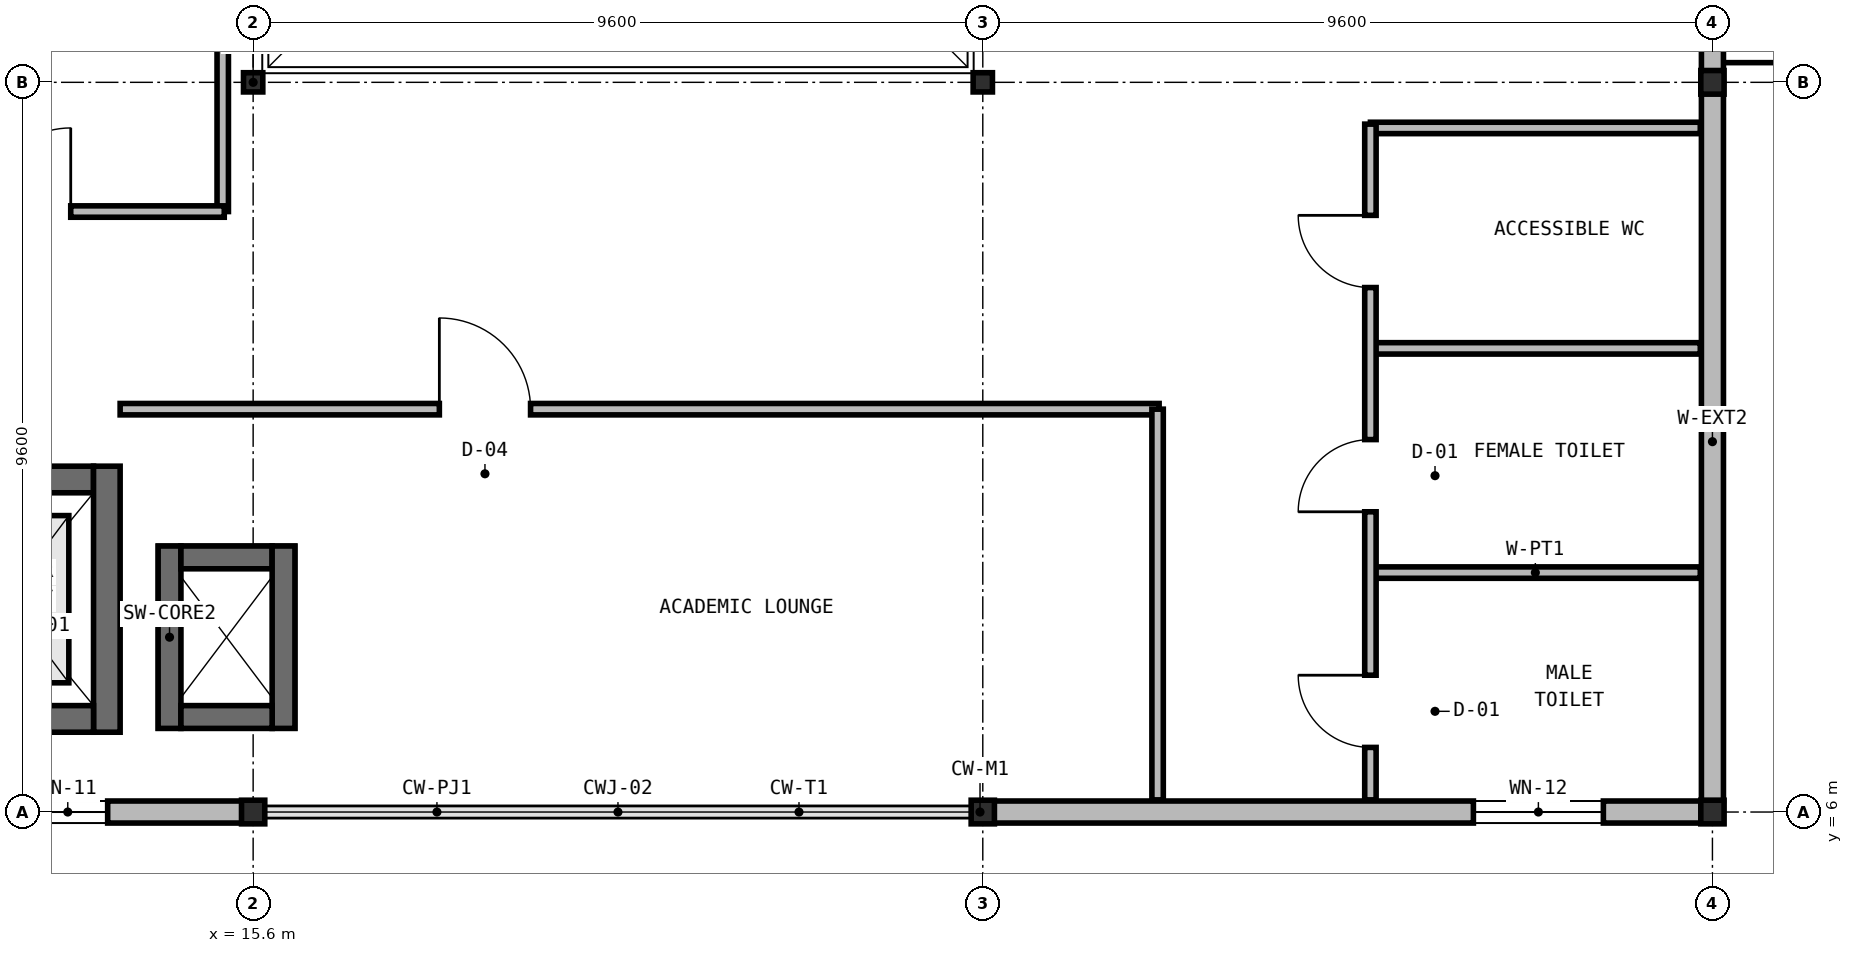
"""IFC4 building model, lengths in metres.
Left out: names, types, materials, properties, quantities, classifications, styles, units other than length and angle.
Written with IfcOpenShell. Run it as: python <this file> out.ifc"""

import sys

from ifc_helpers import new_model, si_unit, direction, frame, frame_2d, origin, origin_2d, place, context, subcontext, project, spatial, rectangle, i_section, extrude, element, fill, save


model = new_model("IFC4")
c1 = context("Model", 3, precision=1e-05, world=origin(), true_north=direction((0.0, 1.0)))
c2 = subcontext(c1, "Body", "Model", "MODEL_VIEW")
j1 = project(units=[si_unit("LENGTHUNIT", "METRE"), si_unit("PLANEANGLEUNIT", "RADIAN")], contexts=[c1])
p1 = place(None, origin())
s1 = spatial("IfcSite", under=j1, at=p1, CompositionType="ELEMENT")
p2 = place(p1, origin())
s2 = spatial("IfcBuilding", under=s1, at=p2, CompositionType="ELEMENT")
p3 = place(p2, frame((0.0, 0.0, 5.25)))
s3 = spatial("IfcBuildingStorey", under=s2, at=p3, CompositionType="ELEMENT", Elevation=5.25)
p4 = place(p3, frame((11.2, 10.375, 0.0), z_axis=(0.0, 0.0, 1.0), x_axis=(1.0, 0.0, 0.0)))
e1 = element("IfcWall", 1, at=p4, inside=s3, PredefinedType="SHEAR", context=c2, shape_type="SweptSolid", body=[
    extrude(rectangle(XDim=2.3, YDim=0.35, at=frame_2d((1.15, 0.0))), origin(), (0.0, 0.0, 1.0), 4.55),
])
p5 = place(p4, frame((0.6, 0.0, 0.0)))
e2 = element("IfcOpeningElement", 2, at=p5, cuts=e1, PredefinedType="OPENING", context=c2, shape_type="SweptSolid", body=[
    extrude(rectangle(XDim=1.1, YDim=2.15, at=frame_2d((0.55, 1.075))), frame((0.0, 0.185, 0.0), z_axis=(0.0, -1.0, 0.0), x_axis=(1.0, 0.0, 0.0)), (0.0, 0.0, 1.0), 0.37),
])
p6 = place(p3, frame((13.675, 10.55, 0.0), z_axis=(0.0, 0.0, 1.0), x_axis=(0.0, -1.0, 0.0)))
e3 = element("IfcWall", 3, at=p6, inside=s3, PredefinedType="SHEAR", context=c2, shape_type="SweptSolid", body=[
    extrude(rectangle(XDim=3.5, YDim=0.35, at=frame_2d((1.75, 0.0))), origin(), (0.0, 0.0, 1.0), 4.55),
])
p7 = place(p3, frame((13.5, 7.225, 0.0), z_axis=(0.0, 0.0, 1.0), x_axis=(-1.0, 0.0, 0.0)))
e4 = element("IfcWall", 4, at=p7, inside=s3, PredefinedType="SHEAR", context=c2, shape_type="SweptSolid", body=[
    extrude(rectangle(XDim=2.3, YDim=0.35, at=frame_2d((1.15, 0.0))), origin(), (0.0, 0.0, 1.0), 4.55),
])
p8 = place(p3, frame((15.6, 6.0, 0.0), z_axis=(0.0, 0.0, 1.0), x_axis=(1.0, 0.0, 0.0)))
e5 = element("IfcColumn", 5, at=p8, inside=s3, PredefinedType="COLUMN", context=c2, shape_type="SweptSolid", body=[
    extrude(i_section(OverallWidth=0.306, OverallDepth=0.311, WebThickness=0.011, FlangeThickness=0.017, at=origin_2d()), origin(), (0.0, 0.0, 1.0), 4.55),
])
p9 = place(p3, frame((15.6, 15.6, 0.0), z_axis=(0.0, 0.0, 1.0), x_axis=(1.0, 0.0, 0.0)))
e6 = element("IfcColumn", 6, at=p9, inside=s3, PredefinedType="COLUMN", context=c2, shape_type="SweptSolid", body=[
    extrude(i_section(OverallWidth=0.254, OverallDepth=0.253, WebThickness=0.009, FlangeThickness=0.014, at=origin_2d()), origin(), (0.0, 0.0, 1.0), 4.55),
])
p10 = place(p3, frame((25.2, 6.0, 0.0), z_axis=(0.0, 0.0, 1.0), x_axis=(1.0, 0.0, 0.0)))
e7 = element("IfcColumn", 7, at=p10, inside=s3, PredefinedType="COLUMN", context=c2, shape_type="SweptSolid", body=[
    extrude(i_section(OverallWidth=0.306, OverallDepth=0.311, WebThickness=0.011, FlangeThickness=0.017, at=origin_2d()), origin(), (0.0, 0.0, 1.0), 4.55),
])
p11 = place(p3, frame((25.2, 15.6, 0.0), z_axis=(0.0, 0.0, 1.0), x_axis=(1.0, 0.0, 0.0)))
e8 = element("IfcColumn", 8, at=p11, inside=s3, PredefinedType="COLUMN", context=c2, shape_type="SweptSolid", body=[
    extrude(i_section(OverallWidth=0.254, OverallDepth=0.253, WebThickness=0.009, FlangeThickness=0.014, at=origin_2d()), origin(), (0.0, 0.0, 1.0), 4.55),
])
for number, where, z_axis, x_axis in (
    (9, (34.8, 6.0, 0.0), (0.0, 0.0, 1.0), (1.0, 0.0, 0.0)),
    (10, (34.8, 15.6, 0.0), (0.0, 0.0, 1.0), (1.0, 0.0, 0.0)),
):
    element("IfcColumn", number, at=place(p3, frame(where, z_axis=z_axis, x_axis=x_axis)), inside=s3, PredefinedType="COLUMN", context=c2, shape_type="SweptSolid", body=[
        extrude(i_section(OverallWidth=0.306, OverallDepth=0.311, WebThickness=0.011, FlangeThickness=0.017, at=origin_2d()), origin(), (0.0, 0.0, 1.0), 4.55),
    ])
p12 = place(p3, frame((14.5, 7.1, 0.0), z_axis=(0.0, 0.0, 1.0), x_axis=(0.0, 1.0, 0.0)))
e11 = element("IfcWall", 11, at=p12, inside=s3, PredefinedType="SHEAR", context=c2, shape_type="SweptSolid", body=[
    extrude(rectangle(XDim=2.4, YDim=0.3, at=frame_2d((1.2, 0.0))), origin(), (0.0, 0.0, 1.0), 4.37),
])
p13 = place(p3, frame((14.65, 9.35, 0.0), z_axis=(0.0, 0.0, 1.0), x_axis=(1.0, 0.0, 0.0)))
e12 = element("IfcWall", 12, at=p13, inside=s3, PredefinedType="SHEAR", context=c2, shape_type="SweptSolid", body=[
    extrude(rectangle(XDim=1.2, YDim=0.3, at=frame_2d((0.6, 0.0))), origin(), (0.0, 0.0, 1.0), 4.37),
])
p14 = place(p3, frame((16.0, 9.5, 0.0), z_axis=(0.0, 0.0, 1.0), x_axis=(0.0, -1.0, 0.0)))
e13 = element("IfcWall", 13, at=p14, inside=s3, PredefinedType="SHEAR", context=c2, shape_type="SweptSolid", body=[
    extrude(rectangle(XDim=2.4, YDim=0.3, at=frame_2d((1.2, 0.0))), origin(), (0.0, 0.0, 1.0), 4.37),
])
p15 = place(p3, frame((15.85, 7.25, 0.0), z_axis=(0.0, 0.0, 1.0), x_axis=(-1.0, 0.0, 0.0)))
e14 = element("IfcWall", 14, at=p15, inside=s3, PredefinedType="SHEAR", context=c2, shape_type="SweptSolid", body=[
    extrude(rectangle(XDim=1.2, YDim=0.3, at=frame_2d((0.6, 0.0))), origin(), (0.0, 0.0, 1.0), 4.37),
])
p16 = place(p3, frame((34.8, 15.596, 0.0), z_axis=(0.0, 0.0, 1.0), x_axis=(0.0, -1.0, 0.0)))
e15 = element("IfcWall", 15, at=p16, inside=s3, PredefinedType="SOLIDWALL", context=c2, shape_type="SweptSolid", body=[
    extrude(rectangle(XDim=9.447, YDim=0.29, at=frame_2d((4.724, 0.0))), origin(), (0.0, 0.0, 1.0), 3.884),
])
p17 = place(p3, frame((34.8, 25.196, 0.0), z_axis=(0.0, 0.0, 1.0), x_axis=(0.0, -1.0, 0.0)))
e16 = element("IfcWall", 16, at=p17, inside=s3, PredefinedType="SOLIDWALL", context=c2, shape_type="SweptSolid", body=[
    extrude(rectangle(XDim=9.592, YDim=0.29, at=frame_2d((4.796, 0.0))), origin(), (0.0, 0.0, 1.0), 3.862),
])
p18 = place(p17, frame((4.2, 0.0, 0.0)))
e17 = element("IfcOpeningElement", 17, at=p18, cuts=e16, PredefinedType="OPENING", context=c2, shape_type="SweptSolid", body=[
    extrude(rectangle(XDim=1.4, YDim=2.2, at=frame_2d((0.7, 1.1))), frame((0.0, 0.155, 0.0), z_axis=(0.0, -1.0, 0.0), x_axis=(1.0, 0.0, 0.0)), (0.0, 0.0, 1.0), 0.31),
])
p19 = place(p3, frame((15.596, 6.0, 0.0), z_axis=(0.0, 0.0, 1.0), x_axis=(-1.0, 0.0, 0.0)))
e18 = element("IfcWall", 18, at=p19, inside=s3, PredefinedType="SOLIDWALL", context=c2, shape_type="SweptSolid", body=[
    extrude(rectangle(XDim=9.741, YDim=0.29, at=frame_2d((4.871, 0.0))), origin(), (0.0, 0.0, 1.0), 3.884),
])
p20 = place(p19, frame((1.91, 0.0, 0.95)))
e19 = element("IfcOpeningElement", 19, at=p20, cuts=e18, PredefinedType="OPENING", context=c2, shape_type="SweptSolid", body=[
    extrude(rectangle(XDim=1.05, YDim=1.64, at=frame_2d((0.525, 0.82))), frame((0.0, 0.155, 0.0), z_axis=(0.0, -1.0, 0.0), x_axis=(1.0, 0.0, 0.0)), (0.0, 0.0, 1.0), 0.31),
])
p21 = place(p19, frame((6.781, 0.0, 0.95)))
e20 = element("IfcOpeningElement", 20, at=p21, cuts=e18, PredefinedType="OPENING", context=c2, shape_type="SweptSolid", body=[
    extrude(rectangle(XDim=1.05, YDim=1.64, at=frame_2d((0.525, 0.82))), frame((0.0, 0.155, 0.0), z_axis=(0.0, -1.0, 0.0), x_axis=(1.0, 0.0, 0.0)), (0.0, 0.0, 1.0), 0.31),
])
p22 = place(p3, frame((34.945, 6.0, 0.0), z_axis=(0.0, 0.0, 1.0), x_axis=(-1.0, 0.0, 0.0)))
e21 = element("IfcWall", 21, at=p22, inside=s3, PredefinedType="SOLIDWALL", context=c2, shape_type="SweptSolid", body=[
    extrude(rectangle(XDim=9.741, YDim=0.29, at=frame_2d((4.871, 0.0))), origin(), (0.0, 0.0, 1.0), 3.884),
])
p23 = place(p22, frame((1.58, 0.0, 0.95)))
e22 = element("IfcOpeningElement", 22, at=p23, cuts=e21, PredefinedType="OPENING", context=c2, shape_type="SweptSolid", body=[
    extrude(rectangle(XDim=1.71, YDim=1.48, at=frame_2d((0.855, 0.74))), frame((0.0, 0.155, 0.0), z_axis=(0.0, -1.0, 0.0), x_axis=(1.0, 0.0, 0.0)), (0.0, 0.0, 1.0), 0.31),
])
for number, where, z_axis, x_axis in (
    (23, (30.3, 9.15, 0.0), (0.0, 0.0, 1.0), (1.0, 0.0, 0.0)),
    (24, (30.3, 12.1, 0.0), (0.0, 0.0, 1.0), (1.0, 0.0, 0.0)),
    (25, (30.3, 15.0, 0.0), (0.0, 0.0, 1.0), (1.0, 0.0, 0.0)),
):
    element("IfcWall", number, at=place(p3, frame(where, z_axis=z_axis, x_axis=x_axis)), inside=s3, PredefinedType="PARTITIONING", context=c2, shape_type="SweptSolid", body=[
        extrude(rectangle(XDim=4.34, YDim=0.15, at=frame_2d((2.17, 0.0))), origin(), (0.0, 0.0, 1.0), 4.23),
    ])
p24 = place(p3, frame((30.3, 6.16, 0.0), z_axis=(0.0, 0.0, 1.0), x_axis=(0.0, 1.0, 0.0)))
e26 = element("IfcWall", 26, at=p24, inside=s3, PredefinedType="PARTITIONING", context=c2, shape_type="SweptSolid", body=[
    extrude(rectangle(XDim=8.89, YDim=0.15, at=frame_2d((4.445, 0.0))), origin(), (0.0, 0.0, 1.0), 4.23),
])
p25 = place(p24, frame((0.69, 0.0, 0.0)))
e27 = element("IfcOpeningElement", 27, at=p25, cuts=e26, PredefinedType="OPENING", context=c2, shape_type="SweptSolid", body=[
    extrude(rectangle(XDim=0.95, YDim=2.1, at=frame_2d((0.475, 1.05))), frame((0.0, 0.085, 0.0), z_axis=(0.0, -1.0, 0.0), x_axis=(1.0, 0.0, 0.0)), (0.0, 0.0, 1.0), 0.17),
])
p26 = place(p24, frame((3.79, 0.0, 0.0)))
e28 = element("IfcOpeningElement", 28, at=p26, cuts=e26, PredefinedType="OPENING", context=c2, shape_type="SweptSolid", body=[
    extrude(rectangle(XDim=0.95, YDim=2.1, at=frame_2d((0.475, 1.05))), frame((0.0, 0.085, 0.0), z_axis=(0.0, -1.0, 0.0), x_axis=(1.0, 0.0, 0.0)), (0.0, 0.0, 1.0), 0.17),
])
p27 = place(p24, frame((6.74, 0.0, 0.0)))
e29 = element("IfcOpeningElement", 29, at=p27, cuts=e26, PredefinedType="OPENING", context=c2, shape_type="SweptSolid", body=[
    extrude(rectangle(XDim=0.95, YDim=2.1, at=frame_2d((0.475, 1.05))), frame((0.0, 0.085, 0.0), z_axis=(0.0, -1.0, 0.0), x_axis=(1.0, 0.0, 0.0)), (0.0, 0.0, 1.0), 0.17),
])
p28 = place(p3, frame((13.85, 11.3, 0.0), z_axis=(0.0, 0.0, 1.0), x_axis=(1.0, 0.0, 0.0)))
e30 = element("IfcWall", 30, at=p28, inside=s3, PredefinedType="PARTITIONING", context=c2, shape_type="SweptSolid", body=[
    extrude(rectangle(XDim=13.67, YDim=0.15, at=frame_2d((6.835, 0.0))), origin(), (0.0, 0.0, 1.0), 4.23),
])
p29 = place(p28, frame((4.2, 0.0, 0.0)))
e31 = element("IfcOpeningElement", 31, at=p29, cuts=e30, PredefinedType="OPENING", context=c2, shape_type="SweptSolid", body=[
    extrude(rectangle(XDim=1.2, YDim=2.2, at=frame_2d((0.6, 1.1))), frame((0.0, 0.085, 0.0), z_axis=(0.0, -1.0, 0.0), x_axis=(1.0, 0.0, 0.0)), (0.0, 0.0, 1.0), 0.17),
])
p30 = place(p3, frame((27.5, 6.16, 0.0), z_axis=(0.0, 0.0, 1.0), x_axis=(0.0, 1.0, 0.0)))
e32 = element("IfcWall", 32, at=p30, inside=s3, PredefinedType="PARTITIONING", context=c2, shape_type="SweptSolid", body=[
    extrude(rectangle(XDim=5.14, YDim=0.15, at=frame_2d((2.57, 0.0))), origin(), (0.0, 0.0, 1.0), 4.23),
])
p31 = place(p3, frame((15.2, 13.9, 0.0), z_axis=(0.0, 0.0, 1.0), x_axis=(0.0, 1.0, 0.0)))
e33 = element("IfcWall", 33, at=p31, inside=s3, PredefinedType="PARTITIONING", context=c2, shape_type="SweptSolid", body=[
    extrude(rectangle(XDim=20.74, YDim=0.15, at=frame_2d((10.37, 0.0))), origin(), (0.0, 0.0, 1.0), 4.23),
])
p32 = place(p31, frame((18.2, 0.0, 0.0)))
e34 = element("IfcOpeningElement", 34, at=p32, cuts=e33, PredefinedType="OPENING", context=c2, shape_type="SweptSolid", body=[
    extrude(rectangle(XDim=1.1, YDim=2.2, at=frame_2d((0.55, 1.1))), frame((0.0, 0.085, 0.0), z_axis=(0.0, -1.0, 0.0), x_axis=(1.0, 0.0, 0.0)), (0.0, 0.0, 1.0), 0.17),
])
p33 = place(p3, frame((10.3, 13.9, 0.0), z_axis=(0.0, 0.0, 1.0), x_axis=(1.0, 0.0, 0.0)))
e35 = element("IfcWall", 35, at=p33, inside=s3, PredefinedType="PARTITIONING", context=c2, shape_type="SweptSolid", body=[
    extrude(rectangle(XDim=4.92, YDim=0.15, at=frame_2d((2.46, 0.0))), origin(), (0.0, 0.0, 1.0), 4.23),
])
p34 = place(p33, frame((1.8, 0.0, 0.0)))
e36 = element("IfcOpeningElement", 36, at=p34, cuts=e35, PredefinedType="OPENING", context=c2, shape_type="SweptSolid", body=[
    extrude(rectangle(XDim=1.1, YDim=2.2, at=frame_2d((0.55, 1.1))), frame((0.0, 0.085, 0.0), z_axis=(0.0, -1.0, 0.0), x_axis=(1.0, 0.0, 0.0)), (0.0, 0.0, 1.0), 0.17),
])
p35 = place(p20, origin())
e37 = element("IfcWindow", 37, at=p35, inside=s3, PartitioningType="SINGLE_PANEL", PredefinedType="WINDOW", context=c2, shape_type="SweptSolid", body=[
    extrude(rectangle(XDim=1.05, YDim=1.64, at=frame_2d((0.525, 0.82))), frame((0.0, 0.03, 0.0), z_axis=(0.0, -1.0, 0.0), x_axis=(1.0, 0.0, 0.0)), (0.0, 0.0, 1.0), 0.06),
])
fill(e19, e37)
p36 = place(p23, origin())
e38 = element("IfcWindow", 38, at=p36, inside=s3, PartitioningType="SINGLE_PANEL", PredefinedType="WINDOW", context=c2, shape_type="SweptSolid", body=[
    extrude(rectangle(XDim=1.71, YDim=1.48, at=frame_2d((0.855, 0.74))), frame((0.0, 0.03, 0.0), z_axis=(0.0, -1.0, 0.0), x_axis=(1.0, 0.0, 0.0)), (0.0, 0.0, 1.0), 0.06),
])
fill(e22, e38)
p37 = place(p25, origin())
e39 = element("IfcDoor", 39, at=p37, inside=s3, OperationType="SINGLE_SWING_RIGHT", PredefinedType="DOOR", context=c2, shape_type="SweptSolid", body=[
    extrude(rectangle(XDim=0.95, YDim=2.1, at=frame_2d((0.475, 1.05))), frame((0.0, 0.025, 0.0), z_axis=(0.0, -1.0, 0.0), x_axis=(1.0, 0.0, 0.0)), (0.0, 0.0, 1.0), 0.05),
])
fill(e27, e39)
p38 = place(p26, origin())
e40 = element("IfcDoor", 40, at=p38, inside=s3, OperationType="SINGLE_SWING_LEFT", PredefinedType="DOOR", context=c2, shape_type="SweptSolid", body=[
    extrude(rectangle(XDim=0.95, YDim=2.1, at=frame_2d((0.475, 1.05))), frame((0.0, 0.025, 0.0), z_axis=(0.0, -1.0, 0.0), x_axis=(1.0, 0.0, 0.0)), (0.0, 0.0, 1.0), 0.05),
])
fill(e28, e40)
p39 = place(p27, origin())
e41 = element("IfcDoor", 41, at=p39, inside=s3, OperationType="SINGLE_SWING_RIGHT", PredefinedType="DOOR", context=c2, shape_type="SweptSolid", body=[
    extrude(rectangle(XDim=0.95, YDim=2.1, at=frame_2d((0.475, 1.05))), frame((0.0, 0.025, 0.0), z_axis=(0.0, -1.0, 0.0), x_axis=(1.0, 0.0, 0.0)), (0.0, 0.0, 1.0), 0.05),
])
fill(e29, e41)
p40 = place(p29, origin())
e42 = element("IfcDoor", 42, at=p40, inside=s3, OperationType="SINGLE_SWING_LEFT", PredefinedType="DOOR", context=c2, shape_type="SweptSolid", body=[
    extrude(rectangle(XDim=1.2, YDim=2.2, at=frame_2d((0.6, 1.1))), frame((0.0, 0.025, 0.0), z_axis=(0.0, -1.0, 0.0), x_axis=(1.0, 0.0, 0.0)), (0.0, 0.0, 1.0), 0.05),
])
fill(e31, e42)
p41 = place(p34, origin())
e43 = element("IfcDoor", 43, at=p41, inside=s3, OperationType="SINGLE_SWING_RIGHT", PredefinedType="DOOR", context=c2, shape_type="SweptSolid", body=[
    extrude(rectangle(XDim=1.1, YDim=2.2, at=frame_2d((0.55, 1.1))), frame((0.0, 0.025, 0.0), z_axis=(0.0, -1.0, 0.0), x_axis=(1.0, 0.0, 0.0)), (0.0, 0.0, 1.0), 0.05),
])
fill(e36, e43)
save(model, sys.argv[1])
